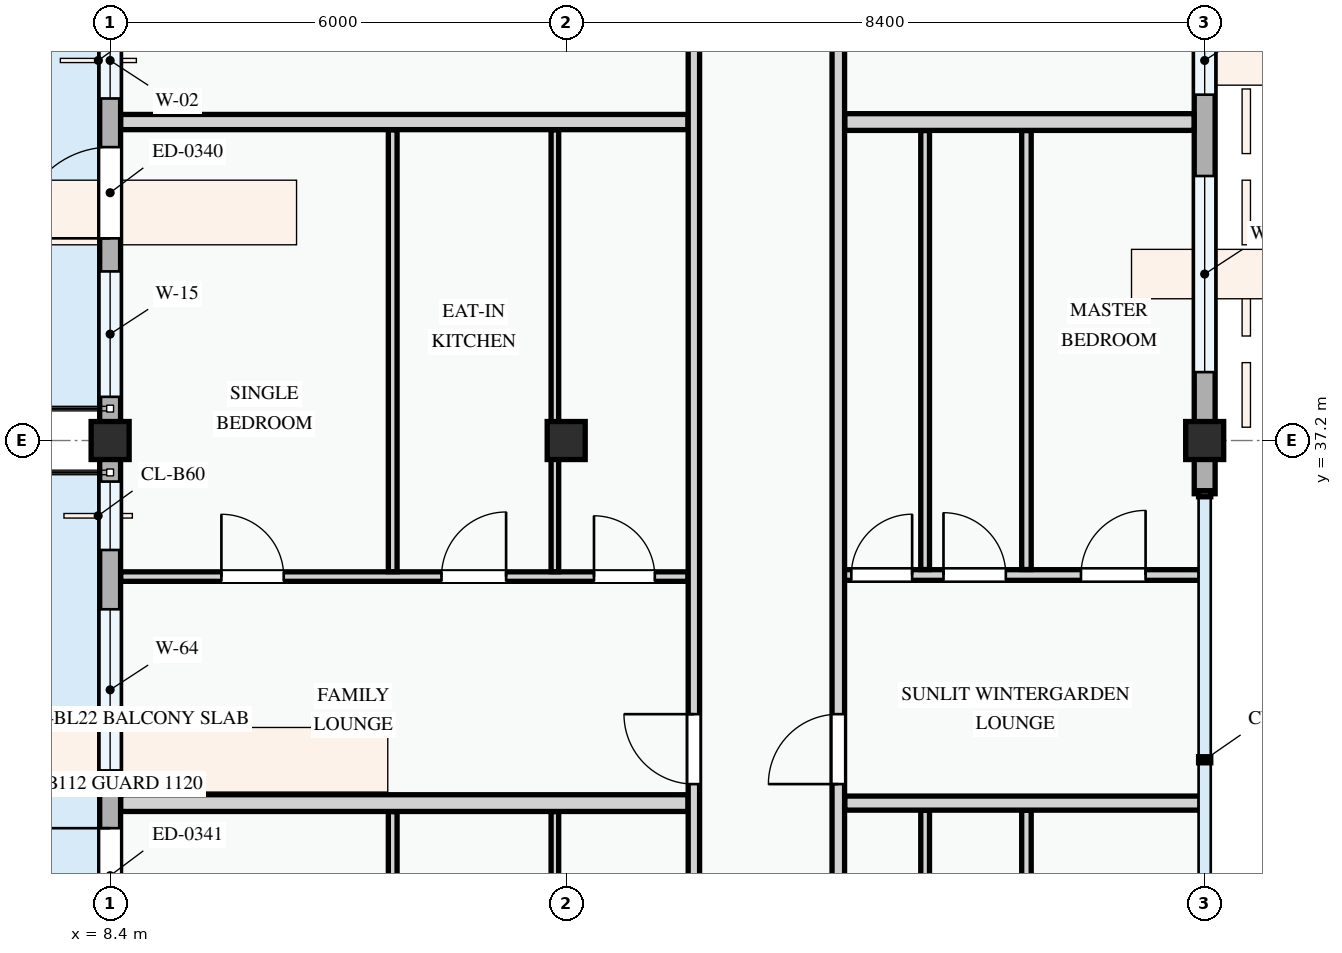
"""IFC4 building model, lengths in metres.
Left out: names, types, materials, properties, quantities, classifications, styles, units other than length and angle.
Written with IfcOpenShell. Run it as: python <this file> out.ifc"""

import sys

from ifc_helpers import new_model, si_unit, direction, frame, frame_2d, origin, origin_2d, place, context, subcontext, project, spatial, rectangle, extrude, element, fill, save


model = new_model("IFC4")
c1 = context("Model", 3, precision=1e-05, world=origin(), true_north=direction((0.0, 1.0)))
c2 = subcontext(c1, "Body", "Model", "MODEL_VIEW")
j1 = project(units=[si_unit("LENGTHUNIT", "METRE"), si_unit("PLANEANGLEUNIT", "RADIAN")], contexts=[c1])
p1 = place(None, origin())
s1 = spatial("IfcSite", under=j1, at=p1, CompositionType="ELEMENT")
p2 = place(p1, origin())
s2 = spatial("IfcBuilding", under=s1, at=p2, CompositionType="ELEMENT")
p3 = place(p2, frame((0.0, 0.0, 24.6)))
s3 = spatial("IfcBuildingStorey", under=s2, at=p3, CompositionType="ELEMENT", Elevation=24.6)
for number, where, z_axis, x_axis in (
    (1, (8.4, 37.2, 0.0), (0.0, 0.0, 1.0), (1.0, 0.0, 0.0)),
    (2, (14.4, 37.2, 0.0), (0.0, 0.0, 1.0), (1.0, 0.0, 0.0)),
    (3, (22.8, 37.2, 0.0), (0.0, 0.0, 1.0), (1.0, 0.0, 0.0)),
):
    element("IfcColumn", number, at=place(p3, frame(where, z_axis=z_axis, x_axis=x_axis)), inside=s3, PredefinedType="COLUMN", context=c2, shape_type="SweptSolid", body=[
        extrude(rectangle(XDim=0.5, YDim=0.5, at=origin_2d()), origin(), (0.0, 0.0, 1.0), 3.3),
    ])
p4 = place(p3, frame((22.8, 36.5, 0.0), z_axis=(0.0, 0.0, 1.0), x_axis=(0.0, 1.0, 0.0)))
e4 = element("IfcWall", 4, at=p4, inside=s3, PredefinedType="STANDARD", context=c2, shape_type="SweptSolid", body=[
    extrude(rectangle(XDim=0.7, YDim=0.275, at=frame_2d((0.35, 0.0))), origin(), (0.0, 0.0, 1.0), 2.425),
])
p5 = place(p3, frame((22.8, 37.2, 0.0), z_axis=(0.0, 0.0, 1.0), x_axis=(0.0, 1.0, 0.0)))
e5 = element("IfcWall", 5, at=p5, inside=s3, PredefinedType="STANDARD", context=c2, shape_type="SweptSolid", body=[
    extrude(rectangle(XDim=6.0, YDim=0.275, at=frame_2d((3.0, 0.0))), origin(), (0.0, 0.0, 1.0), 2.575),
])
p6 = place(p5, frame((0.9, 0.0, 0.78)))
e6 = element("IfcOpeningElement", 6, at=p6, cuts=e5, PredefinedType="OPENING", context=c2, shape_type="SweptSolid", body=[
    extrude(rectangle(XDim=2.58, YDim=1.48, at=frame_2d((1.29, 0.74))), frame((0.0, 0.147, 0.0), z_axis=(0.0, -1.0, 0.0), x_axis=(1.0, 0.0, 0.0)), (0.0, 0.0, 1.0), 0.295),
])
p7 = place(p5, frame((4.55, 0.0, 0.78)))
e7 = element("IfcOpeningElement", 7, at=p7, cuts=e5, PredefinedType="OPENING", context=c2, shape_type="SweptSolid", body=[
    extrude(rectangle(XDim=0.9, YDim=1.2, at=frame_2d((0.45, 0.6))), frame((0.0, 0.147, 0.0), z_axis=(0.0, -1.0, 0.0), x_axis=(1.0, 0.0, 0.0)), (0.0, 0.0, 1.0), 0.295),
])
p8 = place(p3, frame((8.4, 43.2, 0.0), z_axis=(0.0, 0.0, 1.0), x_axis=(0.0, -1.0, 0.0)))
e8 = element("IfcWall", 8, at=p8, inside=s3, PredefinedType="STANDARD", context=c2, shape_type="SweptSolid", body=[
    extrude(rectangle(XDim=6.0, YDim=0.275, at=frame_2d((3.0, 0.0))), origin(), (0.0, 0.0, 1.0), 2.575),
])
p9 = place(p8, frame((2.14, 0.0, 0.0)))
e9 = element("IfcOpeningElement", 9, at=p9, cuts=e8, PredefinedType="OPENING", context=c2, shape_type="SweptSolid", body=[
    extrude(rectangle(XDim=1.2, YDim=2.15, at=frame_2d((0.6, 1.075))), frame((0.0, 0.147, 0.0), z_axis=(0.0, -1.0, 0.0), x_axis=(1.0, 0.0, 0.0)), (0.0, 0.0, 1.0), 0.295),
])
p10 = place(p8, frame((0.5, 0.0, 0.78)))
e10 = element("IfcOpeningElement", 10, at=p10, cuts=e8, PredefinedType="OPENING", context=c2, shape_type="SweptSolid", body=[
    extrude(rectangle(XDim=1.0, YDim=1.25, at=frame_2d((0.5, 0.625))), frame((0.0, 0.147, 0.0), z_axis=(0.0, -1.0, 0.0), x_axis=(1.0, 0.0, 0.0)), (0.0, 0.0, 1.0), 0.295),
])
p11 = place(p8, frame((3.775, 0.0, 0.78)))
e11 = element("IfcOpeningElement", 11, at=p11, cuts=e8, PredefinedType="OPENING", context=c2, shape_type="SweptSolid", body=[
    extrude(rectangle(XDim=1.65, YDim=1.5, at=frame_2d((0.825, 0.75))), frame((0.0, 0.147, 0.0), z_axis=(0.0, -1.0, 0.0), x_axis=(1.0, 0.0, 0.0)), (0.0, 0.0, 1.0), 0.295),
])
p12 = place(p3, frame((8.4, 37.2, 0.0), z_axis=(0.0, 0.0, 1.0), x_axis=(0.0, -1.0, 0.0)))
e12 = element("IfcWall", 12, at=p12, inside=s3, PredefinedType="STANDARD", context=c2, shape_type="SweptSolid", body=[
    extrude(rectangle(XDim=8.4, YDim=0.275, at=frame_2d((4.2, 0.0))), origin(), (0.0, 0.0, 1.0), 2.425),
])
p13 = place(p12, frame((5.1, 0.0, 0.0)))
e13 = element("IfcOpeningElement", 13, at=p13, cuts=e12, PredefinedType="OPENING", context=c2, shape_type="SweptSolid", body=[
    extrude(rectangle(XDim=1.25, YDim=2.2, at=frame_2d((0.625, 1.1))), frame((0.0, 0.147, 0.0), z_axis=(0.0, -1.0, 0.0), x_axis=(1.0, 0.0, 0.0)), (0.0, 0.0, 1.0), 0.295),
])
p14 = place(p12, frame((0.54, 0.0, 0.78)))
e14 = element("IfcOpeningElement", 14, at=p14, cuts=e12, PredefinedType="OPENING", context=c2, shape_type="SweptSolid", body=[
    extrude(rectangle(XDim=0.9, YDim=1.2, at=frame_2d((0.45, 0.6))), frame((0.0, 0.147, 0.0), z_axis=(0.0, -1.0, 0.0), x_axis=(1.0, 0.0, 0.0)), (0.0, 0.0, 1.0), 0.295),
])
p15 = place(p12, frame((2.22, 0.0, 0.78)))
e15 = element("IfcOpeningElement", 15, at=p15, cuts=e12, PredefinedType="OPENING", context=c2, shape_type="SweptSolid", body=[
    extrude(rectangle(XDim=2.12, YDim=1.44, at=frame_2d((1.06, 0.72))), frame((0.0, 0.147, 0.0), z_axis=(0.0, -1.0, 0.0), x_axis=(1.0, 0.0, 0.0)), (0.0, 0.0, 1.0), 0.295),
])
p16 = place(p12, frame((6.705, 0.0, 0.78)))
e16 = element("IfcOpeningElement", 16, at=p16, cuts=e12, PredefinedType="OPENING", context=c2, shape_type="SweptSolid", body=[
    extrude(rectangle(XDim=1.2, YDim=1.5, at=frame_2d((0.6, 0.75))), frame((0.0, 0.147, 0.0), z_axis=(0.0, -1.0, 0.0), x_axis=(1.0, 0.0, 0.0)), (0.0, 0.0, 1.0), 0.295),
])
p17 = place(p3, frame((12.118, 27.11, 0.0), z_axis=(0.0, 0.0, 1.0), x_axis=(0.0, 1.0, 0.0)))
e17 = element("IfcWall", 17, at=p17, inside=s3, PredefinedType="PARTITIONING", context=c2, shape_type="SweptSolid", body=[
    extrude(rectangle(XDim=5.208, YDim=0.115, at=frame_2d((2.604, 0.0))), origin(), (0.0, 0.0, 1.0), 3.0),
])
p18 = place(p3, frame((14.251, 27.11, 0.0), z_axis=(0.0, 0.0, 1.0), x_axis=(0.0, 1.0, 0.0)))
e18 = element("IfcWall", 18, at=p18, inside=s3, PredefinedType="PARTITIONING", context=c2, shape_type="SweptSolid", body=[
    extrude(rectangle(XDim=5.208, YDim=0.1, at=frame_2d((2.604, 0.0))), origin(), (0.0, 0.0, 1.0), 2.425),
])
p19 = place(p3, frame((20.455, 27.122, 0.0), z_axis=(0.0, 0.0, 1.0), x_axis=(0.0, 1.0, 0.0)))
e19 = element("IfcWall", 19, at=p19, inside=s3, PredefinedType="PARTITIONING", context=c2, shape_type="SweptSolid", body=[
    extrude(rectangle(XDim=5.214, YDim=0.125, at=frame_2d((2.607, 0.0))), origin(), (0.0, 0.0, 1.0), 3.0),
])
p20 = place(p3, frame((19.122, 27.122, 0.0), z_axis=(0.0, 0.0, 1.0), x_axis=(0.0, 1.0, 0.0)))
e20 = element("IfcWall", 20, at=p20, inside=s3, PredefinedType="PARTITIONING", context=c2, shape_type="SweptSolid", body=[
    extrude(rectangle(XDim=5.214, YDim=0.115, at=frame_2d((2.607, 0.0))), origin(), (0.0, 0.0, 1.0), 3.0),
])
p21 = place(p3, frame((8.54, 35.41, 0.0), z_axis=(0.0, 0.0, 1.0), x_axis=(1.0, 0.0, 0.0)))
e21 = element("IfcWall", 21, at=p21, inside=s3, PredefinedType="PARTITIONING", context=c2, shape_type="SweptSolid", body=[
    extrude(rectangle(XDim=7.463, YDim=0.125, at=frame_2d((3.732, 0.0))), origin(), (0.0, 0.0, 1.0), 3.0),
])
p22 = place(p21, frame((1.324, 0.0, 0.0)))
e22 = element("IfcOpeningElement", 22, at=p22, cuts=e21, PredefinedType="OPENING", context=c2, shape_type="SweptSolid", body=[
    extrude(rectangle(XDim=0.82, YDim=2.08, at=frame_2d((0.41, 1.04))), frame((0.0, 0.073, 0.0), z_axis=(0.0, -1.0, 0.0), x_axis=(1.0, 0.0, 0.0)), (0.0, 0.0, 1.0), 0.145),
])
p23 = place(p21, frame((4.22, 0.0, 0.0)))
e23 = element("IfcOpeningElement", 23, at=p23, cuts=e21, PredefinedType="OPENING", context=c2, shape_type="SweptSolid", body=[
    extrude(rectangle(XDim=0.85, YDim=2.1, at=frame_2d((0.425, 1.05))), frame((0.0, 0.073, 0.0), z_axis=(0.0, -1.0, 0.0), x_axis=(1.0, 0.0, 0.0)), (0.0, 0.0, 1.0), 0.145),
])
p24 = place(p21, frame((6.226, 0.0, 0.0)))
e24 = element("IfcOpeningElement", 24, at=p24, cuts=e21, PredefinedType="OPENING", context=c2, shape_type="SweptSolid", body=[
    extrude(rectangle(XDim=0.8, YDim=2.1, at=frame_2d((0.4, 1.05))), frame((0.0, 0.073, 0.0), z_axis=(0.0, -1.0, 0.0), x_axis=(1.0, 0.0, 0.0)), (0.0, 0.0, 1.0), 0.145),
])
p25 = place(p3, frame((12.118, 35.475, 0.0), z_axis=(0.0, 0.0, 1.0), x_axis=(0.0, 1.0, 0.0)))
e25 = element("IfcWall", 25, at=p25, inside=s3, PredefinedType="PARTITIONING", context=c2, shape_type="SweptSolid", body=[
    extrude(rectangle(XDim=5.813, YDim=0.115, at=frame_2d((2.907, 0.0))), origin(), (0.0, 0.0, 1.0), 3.0),
])
p26 = place(p3, frame((14.251, 35.475, 0.0), z_axis=(0.0, 0.0, 1.0), x_axis=(0.0, 1.0, 0.0)))
e26 = element("IfcWall", 26, at=p26, inside=s3, PredefinedType="PARTITIONING", context=c2, shape_type="SweptSolid", body=[
    extrude(rectangle(XDim=5.813, YDim=0.1, at=frame_2d((2.907, 0.0))), origin(), (0.0, 0.0, 1.0), 2.425),
])
p27 = place(p3, frame((17.98, 35.431, 0.0), z_axis=(0.0, 0.0, 1.0), x_axis=(1.0, 0.0, 0.0)))
e27 = element("IfcWall", 27, at=p27, inside=s3, PredefinedType="PARTITIONING", context=c2, shape_type="SweptSolid", body=[
    extrude(rectangle(XDim=4.76, YDim=0.14, at=frame_2d((2.38, 0.0))), origin(), (0.0, 0.0, 1.0), 3.0),
])
p28 = place(p27, frame((0.171, 0.0, 0.0)))
e28 = element("IfcOpeningElement", 28, at=p28, cuts=e27, PredefinedType="OPENING", context=c2, shape_type="SweptSolid", body=[
    extrude(rectangle(XDim=0.8, YDim=2.1, at=frame_2d((0.4, 1.05))), frame((0.0, 0.08, 0.0), z_axis=(0.0, -1.0, 0.0), x_axis=(1.0, 0.0, 0.0)), (0.0, 0.0, 1.0), 0.16),
])
p29 = place(p27, frame((1.384, 0.0, 0.0)))
e29 = element("IfcOpeningElement", 29, at=p29, cuts=e27, PredefinedType="OPENING", context=c2, shape_type="SweptSolid", body=[
    extrude(rectangle(XDim=0.82, YDim=2.08, at=frame_2d((0.41, 1.04))), frame((0.0, 0.08, 0.0), z_axis=(0.0, -1.0, 0.0), x_axis=(1.0, 0.0, 0.0)), (0.0, 0.0, 1.0), 0.16),
])
p30 = place(p27, frame((3.193, 0.0, 0.0)))
e30 = element("IfcOpeningElement", 30, at=p30, cuts=e27, PredefinedType="OPENING", context=c2, shape_type="SweptSolid", body=[
    extrude(rectangle(XDim=0.85, YDim=2.1, at=frame_2d((0.425, 1.05))), frame((0.0, 0.08, 0.0), z_axis=(0.0, -1.0, 0.0), x_axis=(1.0, 0.0, 0.0)), (0.0, 0.0, 1.0), 0.16),
])
p31 = place(p3, frame((20.455, 35.503, 0.0), z_axis=(0.0, 0.0, 1.0), x_axis=(0.0, 1.0, 0.0)))
e31 = element("IfcWall", 31, at=p31, inside=s3, PredefinedType="PARTITIONING", context=c2, shape_type="SweptSolid", body=[
    extrude(rectangle(XDim=5.775, YDim=0.125, at=frame_2d((2.888, 0.0))), origin(), (0.0, 0.0, 1.0), 3.0),
])
p32 = place(p3, frame((19.122, 35.503, 0.0), z_axis=(0.0, 0.0, 1.0), x_axis=(0.0, 1.0, 0.0)))
e32 = element("IfcWall", 32, at=p32, inside=s3, PredefinedType="PARTITIONING", context=c2, shape_type="SweptSolid", body=[
    extrude(rectangle(XDim=5.775, YDim=0.115, at=frame_2d((2.888, 0.0))), origin(), (0.0, 0.0, 1.0), 3.0),
])
p33 = place(p3, frame((8.54, 32.43, 0.0), z_axis=(0.0, 0.0, 1.0), x_axis=(1.0, 0.0, 0.0)))
e33 = element("IfcWall", 33, at=p33, inside=s3, PredefinedType="PARTITIONING", context=c2, shape_type="SweptSolid", body=[
    extrude(rectangle(XDim=7.463, YDim=0.22, at=frame_2d((3.732, 0.0))), origin(), (0.0, 0.0, 1.0), 3.0),
])
p34 = place(p3, frame((18.064, 32.43, 0.0), z_axis=(0.0, 0.0, 1.0), x_axis=(1.0, 0.0, 0.0)))
e34 = element("IfcWall", 34, at=p34, inside=s3, PredefinedType="PARTITIONING", context=c2, shape_type="SweptSolid", body=[
    extrude(rectangle(XDim=4.676, YDim=0.185, at=frame_2d((2.338, 0.0))), origin(), (0.0, 0.0, 1.0), 3.0),
])
p35 = place(p3, frame((8.54, 41.39, 0.0), z_axis=(0.0, 0.0, 1.0), x_axis=(1.0, 0.0, 0.0)))
e35 = element("IfcWall", 35, at=p35, inside=s3, PredefinedType="PARTITIONING", context=c2, shape_type="SweptSolid", body=[
    extrude(rectangle(XDim=7.463, YDim=0.2, at=frame_2d((3.732, 0.0))), origin(), (0.0, 0.0, 1.0), 3.0),
])
p36 = place(p3, frame((18.064, 41.39, 0.0), z_axis=(0.0, 0.0, 1.0), x_axis=(1.0, 0.0, 0.0)))
e36 = element("IfcWall", 36, at=p36, inside=s3, PredefinedType="PARTITIONING", context=c2, shape_type="SweptSolid", body=[
    extrude(rectangle(XDim=4.596, YDim=0.22, at=frame_2d((2.298, 0.0))), origin(), (0.0, 0.0, 1.0), 3.0),
])
p37 = place(p3, frame((16.08, 22.66, 0.0), z_axis=(0.0, 0.0, 1.0), x_axis=(0.0, 1.0, 0.0)))
e37 = element("IfcWall", 37, at=p37, inside=s3, PredefinedType="PARTITIONING", context=c2, shape_type="SweptSolid", body=[
    extrude(rectangle(XDim=34.801, YDim=0.15, at=frame_2d((17.4, 0.0))), origin(), (0.0, 0.0, 1.0), 3.0),
])
p38 = place(p37, frame((2.627, 0.0, 0.0)))
e38 = element("IfcOpeningElement", 38, at=p38, cuts=e37, PredefinedType="OPENING", context=c2, shape_type="SweptSolid", body=[
    extrude(rectangle(XDim=0.96, YDim=2.12, at=frame_2d((0.48, 1.06))), frame((0.0, 0.085, 0.0), z_axis=(0.0, -1.0, 0.0), x_axis=(1.0, 0.0, 0.0)), (0.0, 0.0, 1.0), 0.17),
])
p39 = place(p37, frame((10.02, 0.0, 0.0)))
e39 = element("IfcOpeningElement", 39, at=p39, cuts=e37, PredefinedType="OPENING", context=c2, shape_type="SweptSolid", body=[
    extrude(rectangle(XDim=0.92, YDim=2.1, at=frame_2d((0.46, 1.05))), frame((0.0, 0.085, 0.0), z_axis=(0.0, -1.0, 0.0), x_axis=(1.0, 0.0, 0.0)), (0.0, 0.0, 1.0), 0.17),
])
p40 = place(p37, frame((24.355, 0.0, 0.0)))
e40 = element("IfcOpeningElement", 40, at=p40, cuts=e37, PredefinedType="OPENING", context=c2, shape_type="SweptSolid", body=[
    extrude(rectangle(XDim=0.92, YDim=2.1, at=frame_2d((0.46, 1.05))), frame((0.0, 0.085, 0.0), z_axis=(0.0, -1.0, 0.0), x_axis=(1.0, 0.0, 0.0)), (0.0, 0.0, 1.0), 0.17),
])
p41 = place(p3, frame((17.98, 22.66, 0.0), z_axis=(0.0, 0.0, 1.0), x_axis=(0.0, 1.0, 0.0)))
e41 = element("IfcWall", 41, at=p41, inside=s3, PredefinedType="PARTITIONING", context=c2, shape_type="SweptSolid", body=[
    extrude(rectangle(XDim=34.801, YDim=0.165, at=frame_2d((17.4, 0.0))), origin(), (0.0, 0.0, 1.0), 3.0),
])
p42 = place(p41, frame((2.63, 0.0, 0.0)))
e42 = element("IfcOpeningElement", 42, at=p42, cuts=e41, PredefinedType="OPENING", context=c2, shape_type="SweptSolid", body=[
    extrude(rectangle(XDim=0.92, YDim=2.1, at=frame_2d((0.46, 1.05))), frame((0.0, 0.093, 0.0), z_axis=(0.0, -1.0, 0.0), x_axis=(1.0, 0.0, 0.0)), (0.0, 0.0, 1.0), 0.185),
])
p43 = place(p41, frame((10.02, 0.0, 0.0)))
e43 = element("IfcOpeningElement", 43, at=p43, cuts=e41, PredefinedType="OPENING", context=c2, shape_type="SweptSolid", body=[
    extrude(rectangle(XDim=0.92, YDim=2.1, at=frame_2d((0.46, 1.05))), frame((0.0, 0.093, 0.0), z_axis=(0.0, -1.0, 0.0), x_axis=(1.0, 0.0, 0.0)), (0.0, 0.0, 1.0), 0.185),
])
p44 = place(p41, frame((24.289, 0.0, 0.0)))
e44 = element("IfcOpeningElement", 44, at=p44, cuts=e41, PredefinedType="OPENING", context=c2, shape_type="SweptSolid", body=[
    extrude(rectangle(XDim=0.96, YDim=2.12, at=frame_2d((0.48, 1.06))), frame((0.0, 0.093, 0.0), z_axis=(0.0, -1.0, 0.0), x_axis=(1.0, 0.0, 0.0)), (0.0, 0.0, 1.0), 0.185),
])
p45 = place(p6, origin())
e45 = element("IfcWindow", 45, at=p45, inside=s3, PartitioningType="DOUBLE_PANEL_VERTICAL", PredefinedType="WINDOW", context=c2, shape_type="SweptSolid", body=[
    extrude(rectangle(XDim=2.58, YDim=1.48, at=frame_2d((1.29, 0.74))), frame((0.0, 0.03, 0.0), z_axis=(0.0, -1.0, 0.0), x_axis=(1.0, 0.0, 0.0)), (0.0, 0.0, 1.0), 0.06),
])
fill(e6, e45)
p46 = place(p7, origin())
e46 = element("IfcWindow", 46, at=p46, inside=s3, PartitioningType="SINGLE_PANEL", PredefinedType="WINDOW", context=c2, shape_type="SweptSolid", body=[
    extrude(rectangle(XDim=0.9, YDim=1.2, at=frame_2d((0.45, 0.6))), frame((0.0, 0.03, 0.0), z_axis=(0.0, -1.0, 0.0), x_axis=(1.0, 0.0, 0.0)), (0.0, 0.0, 1.0), 0.06),
])
fill(e7, e46)
p47 = place(p9, frame((1.2, 0.0, 0.0), z_axis=(0.0, 0.0, 1.0), x_axis=(-1.0, 0.0, 0.0)))
e47 = element("IfcDoor", 47, at=p47, inside=s3, OperationType="SINGLE_SWING_LEFT", PredefinedType="DOOR", context=c2, shape_type="SweptSolid", body=[
    extrude(rectangle(XDim=1.2, YDim=2.15, at=frame_2d((0.6, 1.075))), frame((0.0, 0.025, 0.0), z_axis=(0.0, -1.0, 0.0), x_axis=(1.0, 0.0, 0.0)), (0.0, 0.0, 1.0), 0.05),
])
fill(e9, e47)
p48 = place(p10, origin())
e48 = element("IfcWindow", 48, at=p48, inside=s3, PartitioningType="SINGLE_PANEL", PredefinedType="WINDOW", context=c2, shape_type="SweptSolid", body=[
    extrude(rectangle(XDim=1.0, YDim=1.25, at=frame_2d((0.5, 0.625))), frame((0.0, 0.03, 0.0), z_axis=(0.0, -1.0, 0.0), x_axis=(1.0, 0.0, 0.0)), (0.0, 0.0, 1.0), 0.06),
])
fill(e10, e48)
p49 = place(p11, origin())
e49 = element("IfcWindow", 49, at=p49, inside=s3, PartitioningType="DOUBLE_PANEL_VERTICAL", PredefinedType="WINDOW", context=c2, shape_type="SweptSolid", body=[
    extrude(rectangle(XDim=1.65, YDim=1.5, at=frame_2d((0.825, 0.75))), frame((0.0, 0.03, 0.0), z_axis=(0.0, -1.0, 0.0), x_axis=(1.0, 0.0, 0.0)), (0.0, 0.0, 1.0), 0.06),
])
fill(e11, e49)
p50 = place(p13, frame((1.25, 0.0, 0.0), z_axis=(0.0, 0.0, 1.0), x_axis=(-1.0, 0.0, 0.0)))
e50 = element("IfcDoor", 50, at=p50, inside=s3, OperationType="SINGLE_SWING_RIGHT", PredefinedType="DOOR", context=c2, shape_type="SweptSolid", body=[
    extrude(rectangle(XDim=1.25, YDim=2.2, at=frame_2d((0.625, 1.1))), frame((0.0, 0.025, 0.0), z_axis=(0.0, -1.0, 0.0), x_axis=(1.0, 0.0, 0.0)), (0.0, 0.0, 1.0), 0.05),
])
fill(e13, e50)
p51 = place(p14, origin())
e51 = element("IfcWindow", 51, at=p51, inside=s3, PartitioningType="SINGLE_PANEL", PredefinedType="WINDOW", context=c2, shape_type="SweptSolid", body=[
    extrude(rectangle(XDim=0.9, YDim=1.2, at=frame_2d((0.45, 0.6))), frame((0.0, 0.03, 0.0), z_axis=(0.0, -1.0, 0.0), x_axis=(1.0, 0.0, 0.0)), (0.0, 0.0, 1.0), 0.06),
])
fill(e14, e51)
p52 = place(p15, origin())
e52 = element("IfcWindow", 52, at=p52, inside=s3, PartitioningType="DOUBLE_PANEL_VERTICAL", PredefinedType="WINDOW", context=c2, shape_type="SweptSolid", body=[
    extrude(rectangle(XDim=2.12, YDim=1.44, at=frame_2d((1.06, 0.72))), frame((0.0, 0.03, 0.0), z_axis=(0.0, -1.0, 0.0), x_axis=(1.0, 0.0, 0.0)), (0.0, 0.0, 1.0), 0.06),
])
fill(e15, e52)
p53 = place(p22, origin())
e53 = element("IfcDoor", 53, at=p53, inside=s3, OperationType="SINGLE_SWING_LEFT", PredefinedType="DOOR", context=c2, shape_type="SweptSolid", body=[
    extrude(rectangle(XDim=0.82, YDim=2.08, at=frame_2d((0.41, 1.04))), frame((0.0, 0.025, 0.0), z_axis=(0.0, -1.0, 0.0), x_axis=(1.0, 0.0, 0.0)), (0.0, 0.0, 1.0), 0.05),
])
fill(e22, e53)
p54 = place(p23, origin())
e54 = element("IfcDoor", 54, at=p54, inside=s3, OperationType="SINGLE_SWING_RIGHT", PredefinedType="DOOR", context=c2, shape_type="SweptSolid", body=[
    extrude(rectangle(XDim=0.85, YDim=2.1, at=frame_2d((0.425, 1.05))), frame((0.0, 0.025, 0.0), z_axis=(0.0, -1.0, 0.0), x_axis=(1.0, 0.0, 0.0)), (0.0, 0.0, 1.0), 0.05),
])
fill(e23, e54)
p55 = place(p24, origin())
e55 = element("IfcDoor", 55, at=p55, inside=s3, OperationType="SINGLE_SWING_LEFT", PredefinedType="DOOR", context=c2, shape_type="SweptSolid", body=[
    extrude(rectangle(XDim=0.8, YDim=2.1, at=frame_2d((0.4, 1.05))), frame((0.0, 0.025, 0.0), z_axis=(0.0, -1.0, 0.0), x_axis=(1.0, 0.0, 0.0)), (0.0, 0.0, 1.0), 0.05),
])
fill(e24, e55)
p56 = place(p28, origin())
e56 = element("IfcDoor", 56, at=p56, inside=s3, OperationType="SINGLE_SWING_RIGHT", PredefinedType="DOOR", context=c2, shape_type="SweptSolid", body=[
    extrude(rectangle(XDim=0.8, YDim=2.1, at=frame_2d((0.4, 1.05))), frame((0.0, 0.025, 0.0), z_axis=(0.0, -1.0, 0.0), x_axis=(1.0, 0.0, 0.0)), (0.0, 0.0, 1.0), 0.05),
])
fill(e28, e56)
p57 = place(p29, origin())
e57 = element("IfcDoor", 57, at=p57, inside=s3, OperationType="SINGLE_SWING_LEFT", PredefinedType="DOOR", context=c2, shape_type="SweptSolid", body=[
    extrude(rectangle(XDim=0.82, YDim=2.08, at=frame_2d((0.41, 1.04))), frame((0.0, 0.025, 0.0), z_axis=(0.0, -1.0, 0.0), x_axis=(1.0, 0.0, 0.0)), (0.0, 0.0, 1.0), 0.05),
])
fill(e29, e57)
p58 = place(p30, origin())
e58 = element("IfcDoor", 58, at=p58, inside=s3, OperationType="SINGLE_SWING_RIGHT", PredefinedType="DOOR", context=c2, shape_type="SweptSolid", body=[
    extrude(rectangle(XDim=0.85, YDim=2.1, at=frame_2d((0.425, 1.05))), frame((0.0, 0.025, 0.0), z_axis=(0.0, -1.0, 0.0), x_axis=(1.0, 0.0, 0.0)), (0.0, 0.0, 1.0), 0.05),
])
fill(e30, e58)
p59 = place(p39, origin())
e59 = element("IfcDoor", 59, at=p59, inside=s3, OperationType="SINGLE_SWING_RIGHT", PredefinedType="DOOR", context=c2, shape_type="SweptSolid", body=[
    extrude(rectangle(XDim=0.92, YDim=2.1, at=frame_2d((0.46, 1.05))), frame((0.0, 0.025, 0.0), z_axis=(0.0, -1.0, 0.0), x_axis=(1.0, 0.0, 0.0)), (0.0, 0.0, 1.0), 0.05),
])
fill(e39, e59)
p60 = place(p43, origin())
e60 = element("IfcDoor", 60, at=p60, inside=s3, OperationType="SINGLE_SWING_LEFT", PredefinedType="DOOR", context=c2, shape_type="SweptSolid", body=[
    extrude(rectangle(XDim=0.92, YDim=2.1, at=frame_2d((0.46, 1.05))), frame((0.0, 0.025, 0.0), z_axis=(0.0, -1.0, 0.0), x_axis=(1.0, 0.0, 0.0)), (0.0, 0.0, 1.0), 0.05),
])
fill(e43, e60)
save(model, sys.argv[1])
